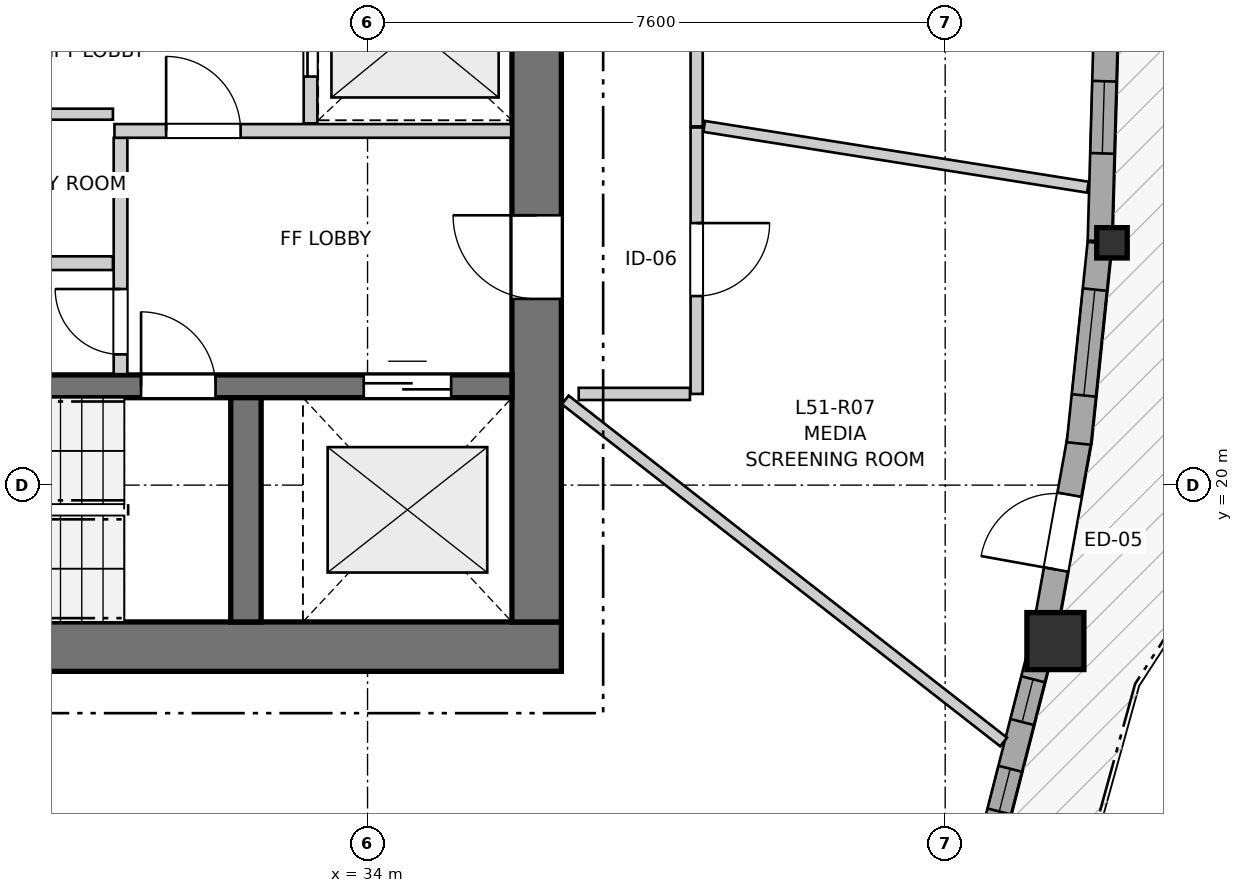
"""IFC4 building model, lengths in metres.
Left out: names, types, materials, properties, quantities, classifications, styles, units other than length and angle.
Written with IfcOpenShell. Run it as: python <this file> out.ifc"""

import sys

from ifc_helpers import new_model, si_unit, direction, frame, frame_2d, origin, origin_2d, place, context, subcontext, project, spatial, rectangle, i_section, extrude, source, transform, mapped, element, fill, save


model = new_model("IFC4")
c1 = context("Model", 3, precision=1e-05, world=origin(), true_north=direction((0.0, 1.0)))
c2 = subcontext(c1, "Body", "Model", "MODEL_VIEW")
j1 = project(units=[si_unit("LENGTHUNIT", "METRE"), si_unit("PLANEANGLEUNIT", "RADIAN")], contexts=[c1])
p1 = place(None, origin())
s1 = spatial("IfcSite", under=j1, at=p1, CompositionType="ELEMENT")
p2 = place(p1, origin())
s2 = spatial("IfcBuilding", under=s1, at=p2, CompositionType="ELEMENT")
p3 = place(p2, frame((0.0, 0.0, 171.4)))
s3 = spatial("IfcBuildingStorey", under=s2, at=p3, CompositionType="ELEMENT", Elevation=171.4)
p4 = place(p3, frame((24.15, 17.875, 0.0), z_axis=(0.0, 0.0, 1.0), x_axis=(1.0, 0.0, 0.0)))
e1 = element("IfcWall", 1, at=p4, inside=s3, PredefinedType="SHEAR", context=c2, shape_type="SweptSolid", body=[
    extrude(rectangle(XDim=12.4, YDim=0.65, at=frame_2d((6.2, 0.0))), origin(), (0.0, 0.0, 1.0), 2.95),
])
p5 = place(p3, frame((36.225, 18.2, 0.0), z_axis=(0.0, 0.0, 1.0), x_axis=(0.0, 1.0, 0.0)))
e2 = element("IfcWall", 2, at=p5, inside=s3, PredefinedType="SHEAR", context=c2, shape_type="SweptSolid", body=[
    extrude(rectangle(XDim=15.6, YDim=0.65, at=frame_2d((7.8, 0.0))), origin(), (0.0, 0.0, 1.0), 2.95),
])
p6 = place(p5, frame((4.25, 0.0, 0.0)))
e3 = element("IfcOpeningElement", 3, at=p6, cuts=e2, PredefinedType="OPENING", context=c2, shape_type="SweptSolid", body=[
    extrude(rectangle(XDim=1.1, YDim=2.15, at=frame_2d((0.55, 1.075))), frame((0.0, 0.335, 0.0), z_axis=(0.0, -1.0, 0.0), x_axis=(1.0, 0.0, 0.0)), (0.0, 0.0, 1.0), 0.67),
])
p7 = place(p5, frame((10.25, 0.0, 0.0)))
e4 = element("IfcOpeningElement", 4, at=p7, cuts=e2, PredefinedType="OPENING", context=c2, shape_type="SweptSolid", body=[
    extrude(rectangle(XDim=1.1, YDim=2.15, at=frame_2d((0.55, 1.075))), frame((0.0, 0.335, 0.0), z_axis=(0.0, -1.0, 0.0), x_axis=(1.0, 0.0, 0.0)), (0.0, 0.0, 1.0), 0.67),
])
p8 = place(p3, frame((24.8, 21.3, 0.0), z_axis=(0.0, 0.0, 1.0), x_axis=(1.0, 0.0, 0.0)))
e5 = element("IfcWall", 5, at=p8, inside=s3, PredefinedType="SHEAR", context=c2, shape_type="SweptSolid", body=[
    extrude(rectangle(XDim=11.1, YDim=0.3, at=frame_2d((5.55, 0.0))), origin(), (0.0, 0.0, 1.0), 2.95),
])
p9 = place(p8, frame((6.22, 0.0, 0.0)))
e6 = element("IfcOpeningElement", 6, at=p9, cuts=e5, PredefinedType="OPENING", context=c2, shape_type="SweptSolid", body=[
    extrude(rectangle(XDim=0.98, YDim=2.15, at=frame_2d((0.49, 1.075))), frame((0.0, 0.16, 0.0), z_axis=(0.0, -1.0, 0.0), x_axis=(1.0, 0.0, 0.0)), (0.0, 0.0, 1.0), 0.32),
])
p10 = place(p8, frame((9.15, 0.0, 0.0)))
e7 = element("IfcOpeningElement", 7, at=p10, cuts=e5, PredefinedType="OPENING", context=c2, shape_type="SweptSolid", body=[
    extrude(rectangle(XDim=1.15, YDim=2.15, at=frame_2d((0.575, 1.075))), frame((0.0, 0.16, 0.0), z_axis=(0.0, -1.0, 0.0), x_axis=(1.0, 0.0, 0.0)), (0.0, 0.0, 1.0), 0.32),
])
p11 = place(p3, frame((32.4, 18.2, 0.0), z_axis=(0.0, 0.0, 1.0), x_axis=(0.0, 1.0, 0.0)))
e8 = element("IfcWall", 8, at=p11, inside=s3, PredefinedType="SHEAR", context=c2, shape_type="SweptSolid", body=[
    extrude(rectangle(XDim=2.95, YDim=0.4, at=frame_2d((1.475, 0.0))), origin(), (0.0, 0.0, 1.0), 2.95),
])
m1 = source(origin(), c2, "Body", "SweptSolid", [
    extrude(rectangle(XDim=0.75, YDim=0.75, at=origin_2d()), origin(), (0.0, 0.0, 1.0), 2.95),
])
p12 = place(p3, frame((43.05, 17.948, 0.0), z_axis=(0.0, 0.0, 1.0), x_axis=(1.0, 0.0, 0.0)))
e9 = element("IfcColumn", 9, at=p12, inside=s3, PredefinedType="COLUMN", context=c2, shape_type="MappedRepresentation", body=[
    mapped(m1, transform((0.0, 0.0, 0.0), x_axis=(1.0, 0.0, 0.0), y_axis=(0.0, 1.0, 0.0), z_axis=(0.0, 0.0, 1.0), scale=1.0)),
])
m2 = source(origin(), c2, "Body", "SweptSolid", [
    extrude(i_section(OverallWidth=0.401, OverallDepth=0.399, WebThickness=0.023, FlangeThickness=0.036, FilletRadius=0.015, at=origin_2d()), origin(), (0.0, 0.0, 1.0), 2.95),
])
p13 = place(p3, frame((43.794, 23.188, 0.0), z_axis=(0.0, 0.0, 1.0), x_axis=(1.0, 0.0, 0.0)))
e10 = element("IfcColumn", 10, at=p13, inside=s3, PredefinedType="PILASTER", context=c2, shape_type="MappedRepresentation", body=[
    mapped(m2, transform((0.0, 0.0, 0.0), x_axis=(1.0, 0.0, 0.0), y_axis=(0.0, 1.0, 0.0), z_axis=(0.0, 0.0, 1.0), scale=1.0)),
])
p14 = place(p3, frame((42.215, 15.329, 0.0), z_axis=(0.0, 0.0, 1.0), x_axis=(0.247653539834, 0.968848659083, 0.0)))
e11 = element("IfcWall", 11, at=p14, inside=s3, PredefinedType="SOLIDWALL", context=c2, shape_type="SweptSolid", body=[
    extrude(rectangle(XDim=2.58, YDim=0.32, at=frame_2d((1.29, 0.0))), origin(), (0.0, 0.0, 1.0), 2.53),
])
p15 = place(p14, frame((0.39, 0.0, 0.82)))
e12 = element("IfcOpeningElement", 12, at=p15, cuts=e11, PredefinedType="OPENING", context=c2, shape_type="SweptSolid", body=[
    extrude(rectangle(XDim=0.58, YDim=1.35, at=frame_2d((0.29, 0.675))), frame((0.0, 0.17, 0.0), z_axis=(0.0, -1.0, 0.0), x_axis=(1.0, 0.0, 0.0)), (0.0, 0.0, 1.0), 0.34),
])
p16 = place(p14, frame((1.605, 0.0, 0.82)))
e13 = element("IfcOpeningElement", 13, at=p16, cuts=e11, PredefinedType="OPENING", context=c2, shape_type="SweptSolid", body=[
    extrude(rectangle(XDim=0.58, YDim=1.35, at=frame_2d((0.29, 0.675))), frame((0.0, 0.17, 0.0), z_axis=(0.0, -1.0, 0.0), x_axis=(1.0, 0.0, 0.0)), (0.0, 0.0, 1.0), 0.34),
])
p17 = place(p3, frame((42.922, 18.139, 0.0), z_axis=(0.0, 0.0, 1.0), x_axis=(0.177063467193, 0.984199435371, 0.0)))
e14 = element("IfcWall", 14, at=p17, inside=s3, PredefinedType="SOLIDWALL", context=c2, shape_type="SweptSolid", body=[
    extrude(rectangle(XDim=2.536, YDim=0.32, at=frame_2d((1.268, 0.0))), origin(), (0.0, 0.0, 1.0), 2.53),
])
p18 = place(p17, frame((0.763, 0.0, 0.0)))
e15 = element("IfcOpeningElement", 15, at=p18, cuts=e14, PredefinedType="OPENING", context=c2, shape_type="SweptSolid", body=[
    extrude(rectangle(XDim=1.0, YDim=2.1, at=frame_2d((0.5, 1.05))), frame((0.0, 0.17, 0.0), z_axis=(0.0, -1.0, 0.0), x_axis=(1.0, 0.0, 0.0)), (0.0, 0.0, 1.0), 0.34),
])
p19 = place(p3, frame((43.358, 20.548, 0.0), z_axis=(0.0, 0.0, 1.0), x_axis=(0.103697188692, 0.994608914628, 0.0)))
e16 = element("IfcWall", 16, at=p19, inside=s3, PredefinedType="SOLIDWALL", context=c2, shape_type="SweptSolid", body=[
    extrude(rectangle(XDim=2.651, YDim=0.32, at=frame_2d((1.326, 0.0))), origin(), (0.0, 0.0, 1.0), 2.53),
])
p20 = place(p19, frame((0.635, 0.0, 0.82)))
e17 = element("IfcOpeningElement", 17, at=p20, cuts=e16, PredefinedType="OPENING", context=c2, shape_type="SweptSolid", body=[
    extrude(rectangle(XDim=1.4, YDim=1.35, at=frame_2d((0.7, 0.675))), frame((0.0, 0.17, 0.0), z_axis=(0.0, -1.0, 0.0), x_axis=(1.0, 0.0, 0.0)), (0.0, 0.0, 1.0), 0.34),
])
p21 = place(p3, frame((43.635, 23.212, 0.0), z_axis=(0.0, 0.0, 1.0), x_axis=(0.028250395457, 0.999600877929, 0.0)))
e18 = element("IfcWall", 18, at=p21, inside=s3, PredefinedType="SOLIDWALL", context=c2, shape_type="SweptSolid", body=[
    extrude(rectangle(XDim=2.636, YDim=0.32, at=frame_2d((1.318, 0.0))), origin(), (0.0, 0.0, 1.0), 2.53),
])
p22 = place(p21, frame((1.152, 0.0, 0.82)))
e19 = element("IfcOpeningElement", 19, at=p22, cuts=e18, PredefinedType="OPENING", context=c2, shape_type="SweptSolid", body=[
    extrude(rectangle(XDim=0.95, YDim=1.35, at=frame_2d((0.475, 0.675))), frame((0.0, 0.17, 0.0), z_axis=(0.0, -1.0, 0.0), x_axis=(1.0, 0.0, 0.0)), (0.0, 0.0, 1.0), 0.34),
])
p23 = place(p3, frame((30.75, 21.46, 0.0), z_axis=(0.0, 0.0, 1.0), x_axis=(0.0, 1.0, 0.0)))
e20 = element("IfcWall", 20, at=p23, inside=s3, PredefinedType="PARTITIONING", context=c2, shape_type="SweptSolid", body=[
    extrude(rectangle(XDim=3.11, YDim=0.18, at=frame_2d((1.555, 0.0))), origin(), (0.0, 0.0, 1.0), 2.95),
])
p24 = place(p23, frame((0.26, 0.0, 0.0)))
e21 = element("IfcOpeningElement", 21, at=p24, cuts=e20, PredefinedType="OPENING", context=c2, shape_type="SweptSolid", body=[
    extrude(rectangle(XDim=0.86, YDim=2.05, at=frame_2d((0.43, 1.025))), frame((0.0, 0.1, 0.0), z_axis=(0.0, -1.0, 0.0), x_axis=(1.0, 0.0, 0.0)), (0.0, 0.0, 1.0), 0.2),
])
p25 = place(p3, frame((30.67, 24.66, 0.0), z_axis=(0.0, 0.0, 1.0), x_axis=(1.0, 0.0, 0.0)))
e22 = element("IfcWall", 22, at=p25, inside=s3, PredefinedType="PARTITIONING", context=c2, shape_type="SweptSolid", body=[
    extrude(rectangle(XDim=5.22, YDim=0.18, at=frame_2d((2.61, 0.0))), origin(), (0.0, 0.0, 1.0), 2.95),
])
p26 = place(p25, frame((0.68, 0.0, 0.0)))
e23 = element("IfcOpeningElement", 23, at=p26, cuts=e22, PredefinedType="OPENING", context=c2, shape_type="SweptSolid", body=[
    extrude(rectangle(XDim=0.98, YDim=2.15, at=frame_2d((0.49, 1.075))), frame((0.0, 0.1, 0.0), z_axis=(0.0, -1.0, 0.0), x_axis=(1.0, 0.0, 0.0)), (0.0, 0.0, 1.0), 0.2),
])
p27 = place(p3, frame((33.25, 24.76, 0.0), z_axis=(0.0, 0.0, 1.0), x_axis=(0.0, 1.0, 0.0)))
e24 = element("IfcWall", 24, at=p27, inside=s3, PredefinedType="PARTITIONING", context=c2, shape_type="SweptSolid", body=[
    extrude(rectangle(XDim=2.48, YDim=0.18, at=frame_2d((1.24, 0.0))), origin(), (0.0, 0.0, 1.0), 2.95),
])
p28 = place(p27, frame((0.615, 0.0, 0.0)))
e25 = element("IfcOpeningElement", 25, at=p28, cuts=e24, PredefinedType="OPENING", context=c2, shape_type="SweptSolid", body=[
    extrude(rectangle(XDim=1.25, YDim=2.15, at=frame_2d((0.625, 1.075))), frame((0.0, 0.1, 0.0), z_axis=(0.0, -1.0, 0.0), x_axis=(1.0, 0.0, 0.0)), (0.0, 0.0, 1.0), 0.2),
])
p29 = place(p3, frame((24.81, 22.92, 0.0), z_axis=(0.0, 0.0, 1.0), x_axis=(1.0, 0.0, 0.0)))
e26 = element("IfcWall", 26, at=p29, inside=s3, PredefinedType="PARTITIONING", context=c2, shape_type="SweptSolid", body=[
    extrude(rectangle(XDim=5.84, YDim=0.18, at=frame_2d((2.92, 0.0))), origin(), (0.0, 0.0, 1.0), 2.95),
])
p30 = place(p3, frame((24.81, 24.88, 0.0), z_axis=(0.0, 0.0, 1.0), x_axis=(1.0, 0.0, 0.0)))
e27 = element("IfcWall", 27, at=p30, inside=s3, PredefinedType="PARTITIONING", context=c2, shape_type="SweptSolid", body=[
    extrude(rectangle(XDim=5.84, YDim=0.145, at=frame_2d((2.92, 0.0))), origin(), (0.0, 0.0, 1.0), 2.95),
])
p31 = place(p30, frame((2.4, 0.0, 0.0)))
e28 = element("IfcOpeningElement", 28, at=p31, cuts=e27, PredefinedType="OPENING", context=c2, shape_type="SweptSolid", body=[
    extrude(rectangle(XDim=0.96, YDim=2.1, at=frame_2d((0.48, 1.05))), frame((0.0, 0.083, 0.0), z_axis=(0.0, -1.0, 0.0), x_axis=(1.0, 0.0, 0.0)), (0.0, 0.0, 1.0), 0.165),
])
p32 = place(p3, frame((38.33, 28.921, 0.0), z_axis=(0.0, 0.0, 1.0), x_axis=(0.0, -1.0, 0.0)))
e29 = element("IfcWall", 29, at=p32, inside=s3, PredefinedType="PARTITIONING", context=c2, shape_type="SweptSolid", body=[
    extrude(rectangle(XDim=4.201, YDim=0.16, at=frame_2d((2.101, 0.0))), origin(), (0.0, 0.0, 1.0), 2.95),
])
p33 = place(p32, frame((1.451, 0.0, 0.0)))
e30 = element("IfcOpeningElement", 30, at=p33, cuts=e29, PredefinedType="OPENING", context=c2, shape_type="SweptSolid", body=[
    extrude(rectangle(XDim=1.3, YDim=2.1, at=frame_2d((0.65, 1.05))), frame((0.0, 0.09, 0.0), z_axis=(0.0, -1.0, 0.0), x_axis=(1.0, 0.0, 0.0)), (0.0, 0.0, 1.0), 0.18),
])
p34 = place(p3, frame((38.33, 24.705, 0.0), z_axis=(0.0, 0.0, 1.0), x_axis=(0.0, -1.0, 0.0)))
e31 = element("IfcWall", 31, at=p34, inside=s3, PredefinedType="PARTITIONING", context=c2, shape_type="SweptSolid", body=[
    extrude(rectangle(XDim=3.505, YDim=0.16, at=frame_2d((1.752, 0.0))), origin(), (0.0, 0.0, 1.0), 2.95),
])
p35 = place(p34, frame((1.258, 0.0, 0.0)))
e32 = element("IfcOpeningElement", 32, at=p35, cuts=e31, PredefinedType="OPENING", context=c2, shape_type="SweptSolid", body=[
    extrude(rectangle(XDim=0.96, YDim=2.1, at=frame_2d((0.48, 1.05))), frame((0.0, 0.09, 0.0), z_axis=(0.0, -1.0, 0.0), x_axis=(1.0, 0.0, 0.0)), (0.0, 0.0, 1.0), 0.18),
])
p36 = place(p3, frame((36.601, 21.121, 0.0), z_axis=(0.0, 0.0, 1.0), x_axis=(0.788361177129, -0.615212690372, 0.0)))
e33 = element("IfcWall", 33, at=p36, inside=s3, PredefinedType="PARTITIONING", context=c2, shape_type="SweptSolid", body=[
    extrude(rectangle(XDim=7.316, YDim=0.145, at=frame_2d((3.658, 0.0))), origin(), (0.0, 0.0, 1.0), 2.95),
])
p37 = place(p3, frame((38.429, 24.719, 0.0), z_axis=(0.0, 0.0, 1.0), x_axis=(0.98767528873, -0.156516849034, 0.0)))
e34 = element("IfcWall", 34, at=p37, inside=s3, PredefinedType="PARTITIONING", context=c2, shape_type="SweptSolid", body=[
    extrude(rectangle(XDim=5.112, YDim=0.145, at=frame_2d((2.556, 0.0))), origin(), (0.0, 0.0, 1.0), 2.95),
])
p38 = place(p3, frame((36.778, 21.2, 0.0), z_axis=(0.0, 0.0, 1.0), x_axis=(1.0, 0.0, 0.0)))
e35 = element("IfcWall", 35, at=p38, inside=s3, PredefinedType="PARTITIONING", context=c2, shape_type="SweptSolid", body=[
    extrude(rectangle(XDim=1.464, YDim=0.16, at=frame_2d((0.732, 0.0))), origin(), (0.0, 0.0, 1.0), 2.95),
])
m3 = source(origin(), c2, "Body", "SweptSolid", [
    extrude(rectangle(XDim=0.58, YDim=1.35, at=frame_2d((0.29, 0.675))), frame((0.0, 0.03, 0.0), z_axis=(0.0, -1.0, 0.0), x_axis=(1.0, 0.0, 0.0)), (0.0, 0.0, 1.0), 0.06),
])
p39 = place(p15, origin())
e36 = element("IfcWindow", 36, at=p39, inside=s3, PartitioningType="SINGLE_PANEL", PredefinedType="WINDOW", context=c2, shape_type="MappedRepresentation", body=[
    mapped(m3, transform((0.0, 0.0, 0.0), x_axis=(1.0, 0.0, 0.0), y_axis=(0.0, 1.0, 0.0), z_axis=(0.0, 0.0, 1.0), scale=1.0)),
])
fill(e12, e36)
p40 = place(p16, origin())
e37 = element("IfcWindow", 37, at=p40, inside=s3, PartitioningType="SINGLE_PANEL", PredefinedType="WINDOW", context=c2, shape_type="MappedRepresentation", body=[
    mapped(m3, transform((0.0, 0.0, 0.0), x_axis=(1.0, 0.0, 0.0), y_axis=(0.0, 1.0, 0.0), z_axis=(0.0, 0.0, 1.0), scale=1.0)),
])
fill(e13, e37)
m4 = source(origin(), c2, "Body", "SweptSolid", [
    extrude(rectangle(XDim=1.0, YDim=2.1, at=frame_2d((0.5, 1.05))), frame((0.0, 0.025, 0.0), z_axis=(0.0, -1.0, 0.0), x_axis=(1.0, 0.0, 0.0)), (0.0, 0.0, 1.0), 0.05),
])
p41 = place(p18, origin())
e38 = element("IfcDoor", 38, at=p41, inside=s3, OperationType="SINGLE_SWING_LEFT", PredefinedType="DOOR", context=c2, shape_type="MappedRepresentation", body=[
    mapped(m4, transform((0.0, 0.0, 0.0), x_axis=(1.0, 0.0, 0.0), y_axis=(0.0, 1.0, 0.0), z_axis=(0.0, 0.0, 1.0), scale=1.0)),
])
fill(e15, e38)
m5 = source(origin(), c2, "Body", "SweptSolid", [
    extrude(rectangle(XDim=1.4, YDim=1.35, at=frame_2d((0.7, 0.675))), frame((0.0, 0.03, 0.0), z_axis=(0.0, -1.0, 0.0), x_axis=(1.0, 0.0, 0.0)), (0.0, 0.0, 1.0), 0.06),
])
p42 = place(p20, origin())
e39 = element("IfcWindow", 39, at=p42, inside=s3, PartitioningType="SINGLE_PANEL", PredefinedType="WINDOW", context=c2, shape_type="MappedRepresentation", body=[
    mapped(m5, transform((0.0, 0.0, 0.0), x_axis=(1.0, 0.0, 0.0), y_axis=(0.0, 1.0, 0.0), z_axis=(0.0, 0.0, 1.0), scale=1.0)),
])
fill(e17, e39)
m6 = source(origin(), c2, "Body", "SweptSolid", [
    extrude(rectangle(XDim=0.95, YDim=1.35, at=frame_2d((0.475, 0.675))), frame((0.0, 0.03, 0.0), z_axis=(0.0, -1.0, 0.0), x_axis=(1.0, 0.0, 0.0)), (0.0, 0.0, 1.0), 0.06),
])
p43 = place(p22, origin())
e40 = element("IfcWindow", 40, at=p43, inside=s3, PartitioningType="SINGLE_PANEL", PredefinedType="WINDOW", context=c2, shape_type="MappedRepresentation", body=[
    mapped(m6, transform((0.0, 0.0, 0.0), x_axis=(1.0, 0.0, 0.0), y_axis=(0.0, 1.0, 0.0), z_axis=(0.0, 0.0, 1.0), scale=1.0)),
])
fill(e19, e40)
m7 = source(origin(), c2, "Body", "SweptSolid", [
    extrude(rectangle(XDim=0.98, YDim=2.15, at=frame_2d((0.49, 1.075))), frame((0.0, 0.025, 0.0), z_axis=(0.0, -1.0, 0.0), x_axis=(1.0, 0.0, 0.0)), (0.0, 0.0, 1.0), 0.05),
])
p44 = place(p9, origin())
e41 = element("IfcDoor", 41, at=p44, inside=s3, OperationType="SINGLE_SWING_LEFT", PredefinedType="DOOR", context=c2, shape_type="MappedRepresentation", body=[
    mapped(m7, transform((0.0, 0.0, 0.0), x_axis=(1.0, 0.0, 0.0), y_axis=(0.0, 1.0, 0.0), z_axis=(0.0, 0.0, 1.0), scale=1.0)),
])
fill(e6, e41)
m8 = source(origin(), c2, "Body", "SweptSolid", [
    extrude(rectangle(XDim=1.15, YDim=2.15, at=frame_2d((0.575, 1.075))), frame((0.0, 0.025, 0.0), z_axis=(0.0, -1.0, 0.0), x_axis=(1.0, 0.0, 0.0)), (0.0, 0.0, 1.0), 0.05),
])
p45 = place(p10, origin())
e42 = element("IfcDoor", 42, at=p45, inside=s3, OperationType="DOUBLE_DOOR_SLIDING", PredefinedType="DOOR", context=c2, shape_type="MappedRepresentation", body=[
    mapped(m8, transform((0.0, 0.0, 0.0), x_axis=(1.0, 0.0, 0.0), y_axis=(0.0, 1.0, 0.0), z_axis=(0.0, 0.0, 1.0), scale=1.0)),
])
fill(e7, e42)
m9 = source(origin(), c2, "Body", "SweptSolid", [
    extrude(rectangle(XDim=1.1, YDim=2.15, at=frame_2d((0.55, 1.075))), frame((0.0, 0.025, 0.0), z_axis=(0.0, -1.0, 0.0), x_axis=(1.0, 0.0, 0.0)), (0.0, 0.0, 1.0), 0.05),
])
p46 = place(p6, origin())
e43 = element("IfcDoor", 43, at=p46, inside=s3, OperationType="SINGLE_SWING_RIGHT", PredefinedType="DOOR", context=c2, shape_type="MappedRepresentation", body=[
    mapped(m9, transform((0.0, 0.0, 0.0), x_axis=(1.0, 0.0, 0.0), y_axis=(0.0, 1.0, 0.0), z_axis=(0.0, 0.0, 1.0), scale=1.0)),
])
fill(e3, e43)
m10 = source(origin(), c2, "Body", "SweptSolid", [
    extrude(rectangle(XDim=0.86, YDim=2.05, at=frame_2d((0.43, 1.025))), frame((0.0, 0.025, 0.0), z_axis=(0.0, -1.0, 0.0), x_axis=(1.0, 0.0, 0.0)), (0.0, 0.0, 1.0), 0.05),
])
p47 = place(p24, origin())
e44 = element("IfcDoor", 44, at=p47, inside=s3, OperationType="SINGLE_SWING_RIGHT", PredefinedType="DOOR", context=c2, shape_type="MappedRepresentation", body=[
    mapped(m10, transform((0.0, 0.0, 0.0), x_axis=(1.0, 0.0, 0.0), y_axis=(0.0, 1.0, 0.0), z_axis=(0.0, 0.0, 1.0), scale=1.0)),
])
fill(e21, e44)
p48 = place(p26, origin())
e45 = element("IfcDoor", 45, at=p48, inside=s3, OperationType="SINGLE_SWING_LEFT", PredefinedType="DOOR", context=c2, shape_type="MappedRepresentation", body=[
    mapped(m7, transform((0.0, 0.0, 0.0), x_axis=(1.0, 0.0, 0.0), y_axis=(0.0, 1.0, 0.0), z_axis=(0.0, 0.0, 1.0), scale=1.0)),
])
fill(e23, e45)
m11 = source(origin(), c2, "Body", "SweptSolid", [
    extrude(rectangle(XDim=1.25, YDim=2.15, at=frame_2d((0.625, 1.075))), frame((0.0, 0.025, 0.0), z_axis=(0.0, -1.0, 0.0), x_axis=(1.0, 0.0, 0.0)), (0.0, 0.0, 1.0), 0.05),
])
p49 = place(p28, origin())
e46 = element("IfcDoor", 46, at=p49, inside=s3, OperationType="DOUBLE_DOOR_SLIDING", PredefinedType="DOOR", context=c2, shape_type="MappedRepresentation", body=[
    mapped(m11, transform((0.0, 0.0, 0.0), x_axis=(1.0, 0.0, 0.0), y_axis=(0.0, 1.0, 0.0), z_axis=(0.0, 0.0, 1.0), scale=1.0)),
])
fill(e25, e46)
m12 = source(origin(), c2, "Body", "SweptSolid", [
    extrude(rectangle(XDim=0.96, YDim=2.1, at=frame_2d((0.48, 1.05))), frame((0.0, 0.025, 0.0), z_axis=(0.0, -1.0, 0.0), x_axis=(1.0, 0.0, 0.0)), (0.0, 0.0, 1.0), 0.05),
])
p50 = place(p35, origin())
e47 = element("IfcDoor", 47, at=p50, inside=s3, OperationType="SINGLE_SWING_LEFT", PredefinedType="DOOR", context=c2, shape_type="MappedRepresentation", body=[
    mapped(m12, transform((0.0, 0.0, 0.0), x_axis=(1.0, 0.0, 0.0), y_axis=(0.0, 1.0, 0.0), z_axis=(0.0, 0.0, 1.0), scale=1.0)),
])
fill(e32, e47)
save(model, sys.argv[1])
